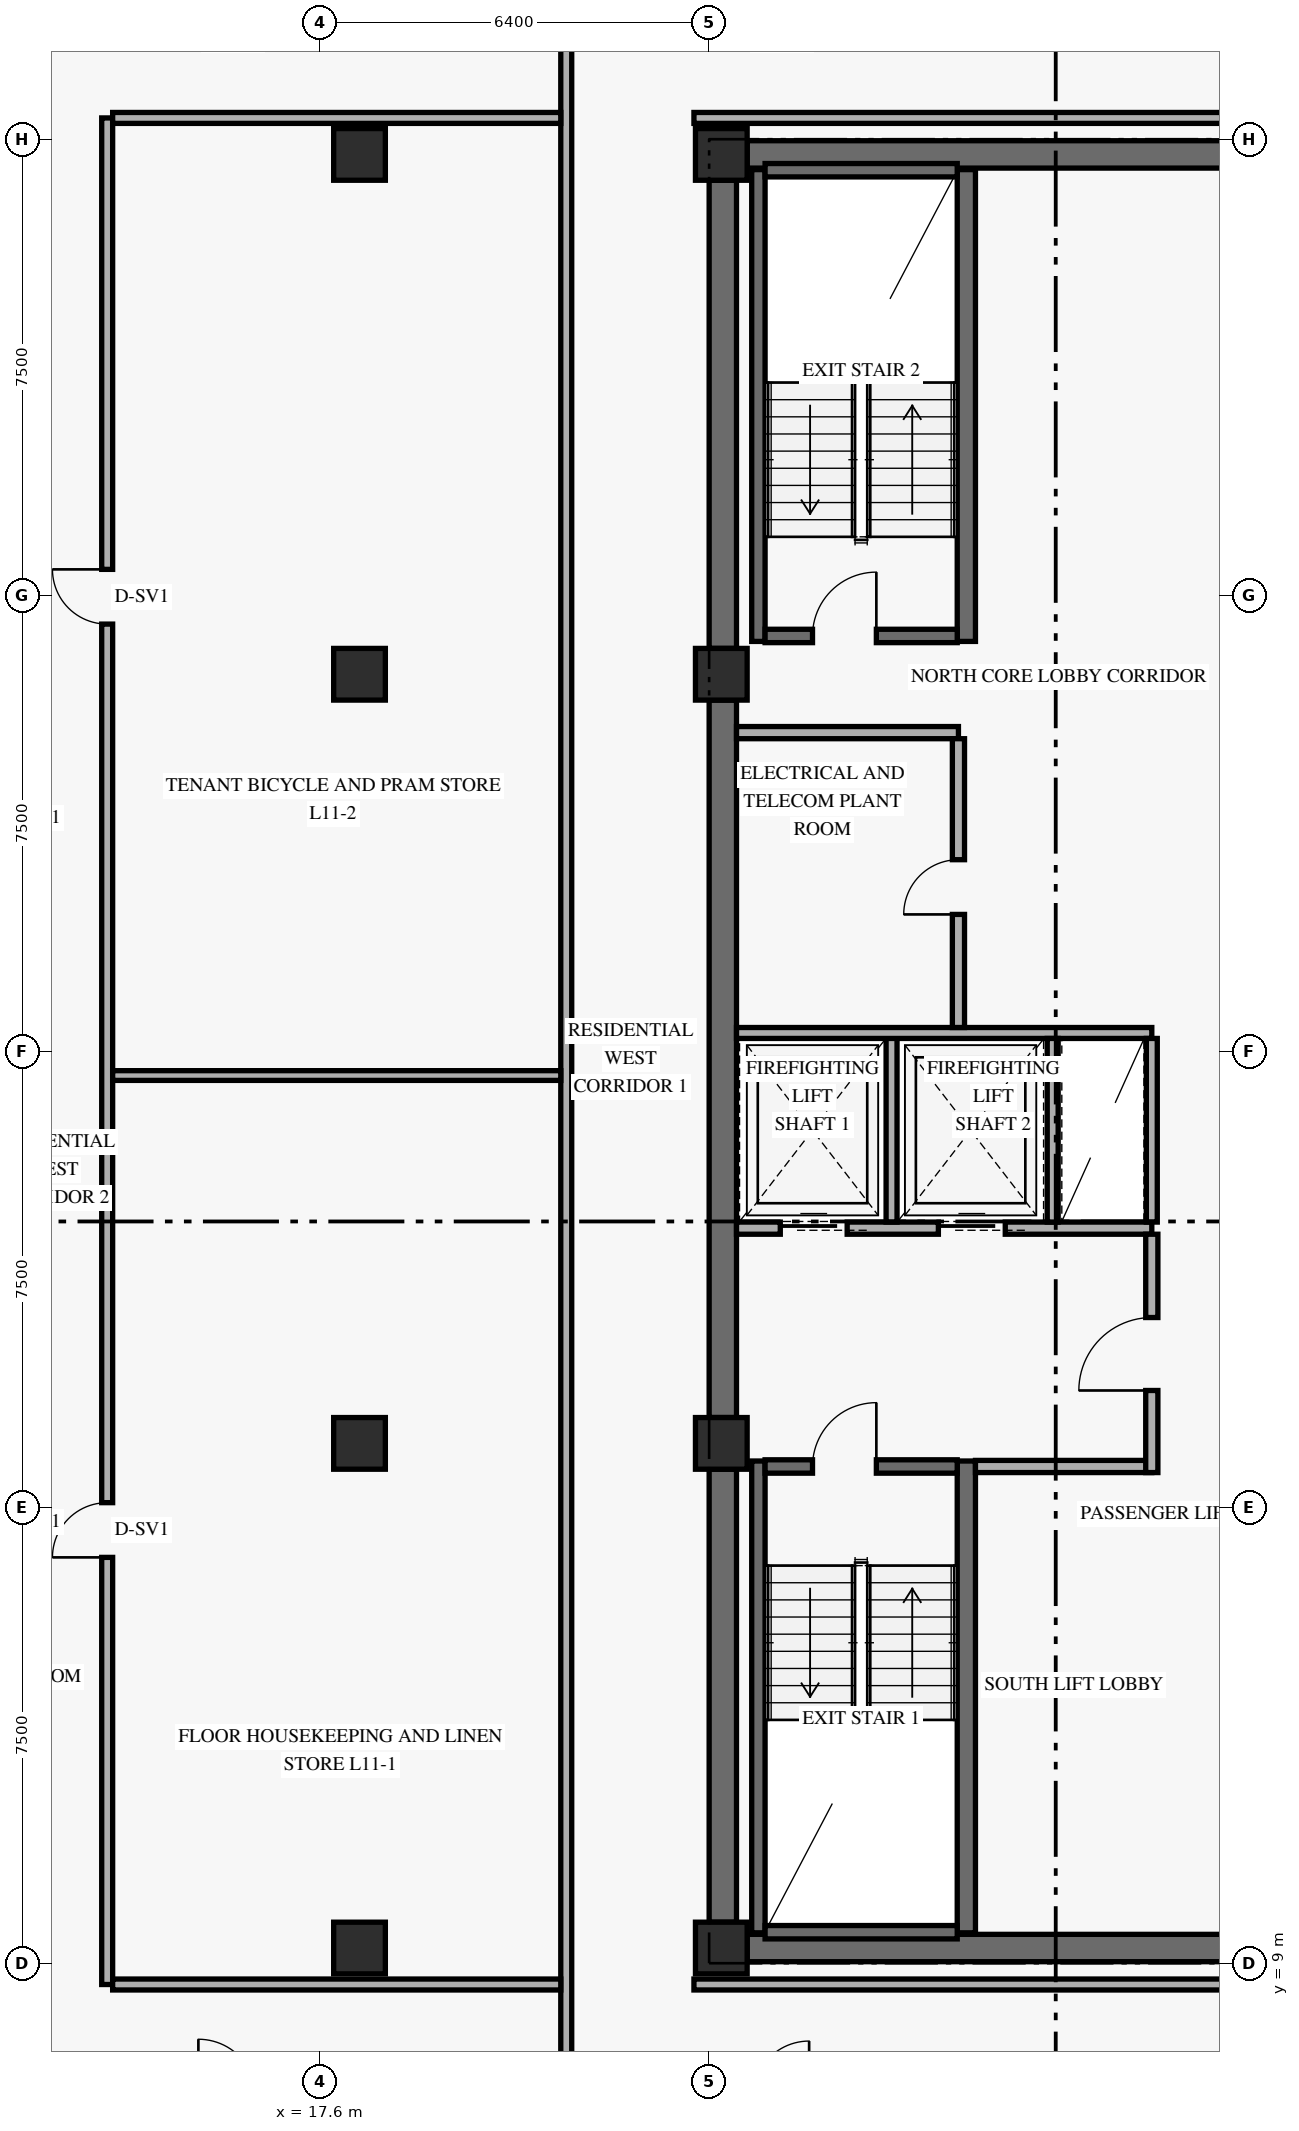
"""IFC4 building model, lengths in metres.
Left out: names, types, materials, properties, quantities, classifications, styles, units other than length and angle.
Written with IfcOpenShell. Run it as: python <this file> out.ifc"""

import sys

from ifc_helpers import new_model, si_unit, direction, frame, frame_2d, origin, origin_2d, place, context, subcontext, project, spatial, rectangle, extrude, element, fill, save


model = new_model("IFC4")
c1 = context("Model", 3, precision=1e-05, world=origin(), true_north=direction((0.0, 1.0)))
c2 = subcontext(c1, "Body", "Model", "MODEL_VIEW")
j1 = project(units=[si_unit("LENGTHUNIT", "METRE"), si_unit("PLANEANGLEUNIT", "RADIAN")], contexts=[c1])
p1 = place(None, origin())
s1 = spatial("IfcSite", under=j1, at=p1, CompositionType="ELEMENT")
p2 = place(p1, origin())
s2 = spatial("IfcBuilding", under=s1, at=p2, CompositionType="ELEMENT")
p3 = place(p2, frame((0.0, 0.0, 45.6)))
s3 = spatial("IfcBuildingStorey", under=s2, at=p3, CompositionType="ELEMENT", Elevation=45.6)
p4 = place(p3, frame((24.225, 9.675, 0.0), z_axis=(0.0, 0.0, 1.0), x_axis=(0.0, 1.0, 0.0)))
e1 = element("IfcWall", 1, at=p4, inside=s3, PredefinedType="SHEAR", context=c2, shape_type="SweptSolid", body=[
    extrude(rectangle(XDim=7.45, YDim=0.45, at=frame_2d((3.725, 0.0))), origin(), (0.0, 0.0, 1.0), 2.667),
])
p5 = place(p3, frame((24.225, 17.975, 0.0), z_axis=(0.0, 0.0, 1.0), x_axis=(0.0, 1.0, 0.0)))
e2 = element("IfcWall", 2, at=p5, inside=s3, PredefinedType="SHEAR", context=c2, shape_type="SweptSolid", body=[
    extrude(rectangle(XDim=11.8, YDim=0.45, at=frame_2d((5.9, 0.0))), origin(), (0.0, 0.0, 1.0), 2.667),
])
p6 = place(p3, frame((24.225, 30.625, 0.0), z_axis=(0.0, 0.0, 1.0), x_axis=(0.0, 1.0, 0.0)))
e3 = element("IfcWall", 3, at=p6, inside=s3, PredefinedType="SHEAR", context=c2, shape_type="SweptSolid", body=[
    extrude(rectangle(XDim=7.7, YDim=0.45, at=frame_2d((3.85, 0.0))), origin(), (0.0, 0.0, 1.0), 2.667),
])
for number, where, z_axis, x_axis in (
    (4, (24.625, 9.25, 0.0), (0.0, 0.0, 1.0), (1.0, 0.0, 0.0)),
    (5, (24.625, 38.75, 0.0), (0.0, 0.0, 1.0), (1.0, 0.0, 0.0)),
):
    element("IfcWall", number, at=place(p3, frame(where, z_axis=z_axis, x_axis=x_axis)), inside=s3, PredefinedType="SHEAR", context=c2, shape_type="SweptSolid", body=[
        extrude(rectangle(XDim=10.15, YDim=0.45, at=frame_2d((5.075, 0.0))), origin(), (0.0, 0.0, 1.0), 3.36),
    ])
p7 = place(p3, frame((24.81, 9.5, 0.0), z_axis=(0.0, 0.0, 1.0), x_axis=(0.0, 1.0, 0.0)))
e6 = element("IfcWall", 6, at=p7, inside=s3, PredefinedType="SHEAR", context=c2, shape_type="SweptSolid", body=[
    extrude(rectangle(XDim=7.76, YDim=0.22, at=frame_2d((3.88, 0.0))), origin(), (0.0, 0.0, 1.0), 3.36),
])
p8 = place(p3, frame((28.23, 9.5, 0.0), z_axis=(0.0, 0.0, 1.0), x_axis=(0.0, 1.0, 0.0)))
e7 = element("IfcWall", 7, at=p8, inside=s3, PredefinedType="SHEAR", context=c2, shape_type="SweptSolid", body=[
    extrude(rectangle(XDim=7.76, YDim=0.3, at=frame_2d((3.88, 0.0))), origin(), (0.0, 0.0, 1.0), 3.36),
])
p9 = place(p3, frame((24.92, 9.51, 0.0), z_axis=(0.0, 0.0, 1.0), x_axis=(1.0, 0.0, 0.0)))
e8 = element("IfcWall", 8, at=p9, inside=s3, PredefinedType="SHEAR", context=c2, shape_type="SweptSolid", body=[
    extrude(rectangle(XDim=3.16, YDim=0.22, at=frame_2d((1.58, 0.0))), origin(), (0.0, 0.0, 1.0), 3.36),
])
p10 = place(p3, frame((24.92, 17.17, 0.0), z_axis=(0.0, 0.0, 1.0), x_axis=(1.0, 0.0, 0.0)))
e9 = element("IfcWall", 9, at=p10, inside=s3, PredefinedType="SHEAR", context=c2, shape_type="SweptSolid", body=[
    extrude(rectangle(XDim=3.16, YDim=0.22, at=frame_2d((1.58, 0.0))), origin(), (0.0, 0.0, 1.0), 3.36),
])
p11 = place(p10, frame((0.78, 0.0, 0.0)))
e10 = element("IfcOpeningElement", 10, at=p11, cuts=e9, PredefinedType="OPENING", context=c2, shape_type="SweptSolid", body=[
    extrude(rectangle(XDim=1.05, YDim=2.15, at=frame_2d((0.525, 1.075))), frame((0.0, 0.12, 0.0), z_axis=(0.0, -1.0, 0.0), x_axis=(1.0, 0.0, 0.0)), (0.0, 0.0, 1.0), 0.24),
])
p12 = place(p3, frame((24.81, 30.74, 0.0), z_axis=(0.0, 0.0, 1.0), x_axis=(0.0, 1.0, 0.0)))
e11 = element("IfcWall", 11, at=p12, inside=s3, PredefinedType="SHEAR", context=c2, shape_type="SweptSolid", body=[
    extrude(rectangle(XDim=7.76, YDim=0.22, at=frame_2d((3.88, 0.0))), origin(), (0.0, 0.0, 1.0), 3.36),
])
p13 = place(p3, frame((28.23, 30.74, 0.0), z_axis=(0.0, 0.0, 1.0), x_axis=(0.0, 1.0, 0.0)))
e12 = element("IfcWall", 12, at=p13, inside=s3, PredefinedType="SHEAR", context=c2, shape_type="SweptSolid", body=[
    extrude(rectangle(XDim=7.76, YDim=0.3, at=frame_2d((3.88, 0.0))), origin(), (0.0, 0.0, 1.0), 3.36),
])
p14 = place(p3, frame((24.92, 30.83, 0.0), z_axis=(0.0, 0.0, 1.0), x_axis=(1.0, 0.0, 0.0)))
e13 = element("IfcWall", 13, at=p14, inside=s3, PredefinedType="SHEAR", context=c2, shape_type="SweptSolid", body=[
    extrude(rectangle(XDim=3.16, YDim=0.22, at=frame_2d((1.58, 0.0))), origin(), (0.0, 0.0, 1.0), 3.36),
])
p15 = place(p14, frame((0.78, 0.0, 0.0)))
e14 = element("IfcOpeningElement", 14, at=p15, cuts=e13, PredefinedType="OPENING", context=c2, shape_type="SweptSolid", body=[
    extrude(rectangle(XDim=1.05, YDim=2.15, at=frame_2d((0.525, 1.075))), frame((0.0, 0.12, 0.0), z_axis=(0.0, -1.0, 0.0), x_axis=(1.0, 0.0, 0.0)), (0.0, 0.0, 1.0), 0.24),
])
p16 = place(p3, frame((24.92, 38.49, 0.0), z_axis=(0.0, 0.0, 1.0), x_axis=(1.0, 0.0, 0.0)))
e15 = element("IfcWall", 15, at=p16, inside=s3, PredefinedType="SHEAR", context=c2, shape_type="SweptSolid", body=[
    extrude(rectangle(XDim=3.16, YDim=0.22, at=frame_2d((1.58, 0.0))), origin(), (0.0, 0.0, 1.0), 3.36),
])
for number, where, z_axis, x_axis in (
    (16, (18.25, 9.25, 0.0), (0.0, 0.0, 1.0), (1.0, 0.0, 0.0)),
    (17, (18.25, 17.55, 0.0), (0.0, 0.0, 1.0), (1.0, 0.0, 0.0)),
    (18, (18.25, 30.2, 0.0), (0.0, 0.0, 1.0), (1.0, 0.0, 0.0)),
    (19, (18.25, 38.75, 0.0), (0.0, 0.0, 1.0), (1.0, 0.0, 0.0)),
    (20, (24.2, 9.25, 0.0), (0.0, 0.0, 1.0), (1.0, 0.0, 0.0)),
    (21, (24.2, 17.55, 0.0), (0.0, 0.0, 1.0), (1.0, 0.0, 0.0)),
    (22, (24.2, 30.2, 0.0), (0.0, 0.0, 1.0), (1.0, 0.0, 0.0)),
    (23, (24.2, 38.75, 0.0), (0.0, 0.0, 1.0), (1.0, 0.0, 0.0)),
):
    element("IfcColumn", number, at=place(p3, frame(where, z_axis=z_axis, x_axis=x_axis)), inside=s3, PredefinedType="COLUMN", context=c2, shape_type="SweptSolid", body=[
        extrude(rectangle(XDim=0.85, YDim=0.85, at=origin_2d()), origin(), (0.0, 0.0, 1.0), 3.6),
    ])
p17 = place(p3, frame((24.45, 21.09, 0.0), z_axis=(0.0, 0.0, 1.0), x_axis=(1.0, 0.0, 0.0)))
e24 = element("IfcWall", 24, at=p17, inside=s3, PredefinedType="STANDARD", context=c2, shape_type="SweptSolid", body=[
    extrude(rectangle(XDim=6.83, YDim=0.2, at=frame_2d((3.415, 0.0))), origin(), (0.0, 0.0, 1.0), 3.36),
])
p18 = place(p17, frame((0.72, 0.0, 0.0)))
e25 = element("IfcOpeningElement", 25, at=p18, cuts=e24, PredefinedType="OPENING", context=c2, shape_type="SweptSolid", body=[
    extrude(rectangle(XDim=1.1, YDim=2.2, at=frame_2d((0.55, 1.1))), frame((0.0, 0.11, 0.0), z_axis=(0.0, -1.0, 0.0), x_axis=(1.0, 0.0, 0.0)), (0.0, 0.0, 1.0), 0.22),
])
p19 = place(p17, frame((3.32, 0.0, 0.0)))
e26 = element("IfcOpeningElement", 26, at=p19, cuts=e24, PredefinedType="OPENING", context=c2, shape_type="SweptSolid", body=[
    extrude(rectangle(XDim=1.1, YDim=2.2, at=frame_2d((0.55, 1.1))), frame((0.0, 0.11, 0.0), z_axis=(0.0, -1.0, 0.0), x_axis=(1.0, 0.0, 0.0)), (0.0, 0.0, 1.0), 0.22),
])
p20 = place(p3, frame((28.38, 17.17, 0.0), z_axis=(0.0, 0.0, 1.0), x_axis=(1.0, 0.0, 0.0)))
e27 = element("IfcWall", 27, at=p20, inside=s3, PredefinedType="STANDARD", context=c2, shape_type="SweptSolid", body=[
    extrude(rectangle(XDim=2.9, YDim=0.2, at=frame_2d((1.45, 0.0))), origin(), (0.0, 0.0, 1.0), 3.36),
])
p21 = place(p3, frame((31.28, 17.07, 0.0), z_axis=(0.0, 0.0, 1.0), x_axis=(0.0, 1.0, 0.0)))
e28 = element("IfcWall", 28, at=p21, inside=s3, PredefinedType="STANDARD", context=c2, shape_type="SweptSolid", body=[
    extrude(rectangle(XDim=3.92, YDim=0.2, at=frame_2d((1.96, 0.0))), origin(), (0.0, 0.0, 1.0), 2.649),
])
p22 = place(p21, frame((1.35, 0.0, 0.0)))
e29 = element("IfcOpeningElement", 29, at=p22, cuts=e28, PredefinedType="OPENING", context=c2, shape_type="SweptSolid", body=[
    extrude(rectangle(XDim=1.2, YDim=2.15, at=frame_2d((0.6, 1.075))), frame((0.0, 0.11, 0.0), z_axis=(0.0, -1.0, 0.0), x_axis=(1.0, 0.0, 0.0)), (0.0, 0.0, 1.0), 0.22),
])
p23 = place(p3, frame((27.0, 21.19, 0.0), z_axis=(0.0, 0.0, 1.0), x_axis=(0.0, 1.0, 0.0)))
e30 = element("IfcWall", 30, at=p23, inside=s3, PredefinedType="STANDARD", context=c2, shape_type="SweptSolid", body=[
    extrude(rectangle(XDim=3.11, YDim=0.18, at=frame_2d((1.555, 0.0))), origin(), (0.0, 0.0, 1.0), 3.36),
])
p24 = place(p3, frame((24.45, 24.3, 0.0), z_axis=(0.0, 0.0, 1.0), x_axis=(1.0, 0.0, 0.0)))
e31 = element("IfcWall", 31, at=p24, inside=s3, PredefinedType="STANDARD", context=c2, shape_type="SweptSolid", body=[
    extrude(rectangle(XDim=6.83, YDim=0.18, at=frame_2d((3.415, 0.0))), origin(), (0.0, 0.0, 1.0), 3.36),
])
for number, where, z_axis, x_axis in (
    (32, (29.65, 21.19, 0.0), (0.0, 0.0, 1.0), (0.0, 1.0, 0.0)),
    (33, (31.28, 21.19, 0.0), (0.0, 0.0, 1.0), (0.0, 1.0, 0.0)),
):
    element("IfcWall", number, at=place(p3, frame(where, z_axis=z_axis, x_axis=x_axis)), inside=s3, PredefinedType="STANDARD", context=c2, shape_type="SweptSolid", body=[
        extrude(rectangle(XDim=3.02, YDim=0.18, at=frame_2d((1.51, 0.0))), origin(), (0.0, 0.0, 1.0), 3.36),
    ])
p25 = place(p3, frame((24.45, 29.24, 0.0), z_axis=(0.0, 0.0, 1.0), x_axis=(1.0, 0.0, 0.0)))
e34 = element("IfcWall", 34, at=p25, inside=s3, PredefinedType="STANDARD", context=c2, shape_type="SweptSolid", body=[
    extrude(rectangle(XDim=3.65, YDim=0.2, at=frame_2d((1.825, 0.0))), origin(), (0.0, 0.0, 1.0), 3.36),
])
p26 = place(p3, frame((28.1, 24.39, 0.0), z_axis=(0.0, 0.0, 1.0), x_axis=(0.0, 1.0, 0.0)))
e35 = element("IfcWall", 35, at=p26, inside=s3, PredefinedType="STANDARD", context=c2, shape_type="SweptSolid", body=[
    extrude(rectangle(XDim=4.75, YDim=0.2, at=frame_2d((2.375, 0.0))), origin(), (0.0, 0.0, 1.0), 3.36),
])
p27 = place(p26, frame((1.86, 0.0, 0.0)))
e36 = element("IfcOpeningElement", 36, at=p27, cuts=e35, PredefinedType="OPENING", context=c2, shape_type="SweptSolid", body=[
    extrude(rectangle(XDim=0.9, YDim=2.1, at=frame_2d((0.45, 1.05))), frame((0.0, 0.11, 0.0), z_axis=(0.0, -1.0, 0.0), x_axis=(1.0, 0.0, 0.0)), (0.0, 0.0, 1.0), 0.22),
])
p28 = place(p3, frame((21.65, 6.8, 0.0), z_axis=(0.0, 0.0, 1.0), x_axis=(0.0, 1.0, 0.0)))
e37 = element("IfcWall", 37, at=p28, inside=s3, PredefinedType="STANDARD", context=c2, shape_type="SweptSolid", body=[
    extrude(rectangle(XDim=34.4, YDim=0.18, at=frame_2d((17.2, 0.0))), origin(), (0.0, 0.0, 1.0), 2.649),
])
for number, where, z_axis, x_axis in (
    (38, (23.75, 8.65, 0.0), (0.0, 0.0, 1.0), (1.0, 0.0, 0.0)),
    (39, (23.75, 39.35, 0.0), (0.0, 0.0, 1.0), (1.0, 0.0, 0.0)),
):
    element("IfcWall", number, at=place(p3, frame(where, z_axis=z_axis, x_axis=x_axis)), inside=s3, PredefinedType="STANDARD", context=c2, shape_type="SweptSolid", body=[
        extrude(rectangle(XDim=11.67, YDim=0.18, at=frame_2d((5.835, 0.0))), origin(), (0.0, 0.0, 1.0), 2.649),
    ])
p29 = place(p3, frame((14.1, 8.65, 0.0), z_axis=(0.0, 0.0, 1.0), x_axis=(0.0, 1.0, 0.0)))
e40 = element("IfcWall", 40, at=p29, inside=s3, PredefinedType="STANDARD", context=c2, shape_type="SweptSolid", body=[
    extrude(rectangle(XDim=30.7, YDim=0.18, at=frame_2d((15.35, 0.0))), origin(), (0.0, 0.0, 1.0), 2.649),
])
p30 = place(p29, frame((7.025, 0.0, 0.0)))
e41 = element("IfcOpeningElement", 41, at=p30, cuts=e40, PredefinedType="OPENING", context=c2, shape_type="SweptSolid", body=[
    extrude(rectangle(XDim=0.9, YDim=2.1, at=frame_2d((0.45, 1.05))), frame((0.0, 0.1, 0.0), z_axis=(0.0, -1.0, 0.0), x_axis=(1.0, 0.0, 0.0)), (0.0, 0.0, 1.0), 0.2),
])
p31 = place(p29, frame((22.375, 0.0, 0.0)))
e42 = element("IfcOpeningElement", 42, at=p31, cuts=e40, PredefinedType="OPENING", context=c2, shape_type="SweptSolid", body=[
    extrude(rectangle(XDim=0.9, YDim=2.1, at=frame_2d((0.45, 1.05))), frame((0.0, 0.1, 0.0), z_axis=(0.0, -1.0, 0.0), x_axis=(1.0, 0.0, 0.0)), (0.0, 0.0, 1.0), 0.2),
])
for number, where, z_axis, x_axis in (
    (43, (14.19, 8.65, 0.0), (0.0, 0.0, 1.0), (1.0, 0.0, 0.0)),
    (44, (14.19, 39.35, 0.0), (0.0, 0.0, 1.0), (1.0, 0.0, 0.0)),
):
    element("IfcWall", number, at=place(p3, frame(where, z_axis=z_axis, x_axis=x_axis)), inside=s3, PredefinedType="STANDARD", context=c2, shape_type="SweptSolid", body=[
        extrude(rectangle(XDim=7.37, YDim=0.18, at=frame_2d((3.685, 0.0))), origin(), (0.0, 0.0, 1.0), 2.649),
    ])
p32 = place(p3, frame((14.19, 23.6, 0.0), z_axis=(0.0, 0.0, 1.0), x_axis=(1.0, 0.0, 0.0)))
e45 = element("IfcWall", 45, at=p32, inside=s3, PredefinedType="PARTITIONING", context=c2, shape_type="SweptSolid", body=[
    extrude(rectangle(XDim=7.37, YDim=0.16, at=frame_2d((3.685, 0.0))), origin(), (0.0, 0.0, 1.0), 2.649),
])
p33 = place(p11, frame((1.05, 0.0, 0.0), z_axis=(0.0, 0.0, 1.0), x_axis=(-1.0, 0.0, 0.0)))
e46 = element("IfcDoor", 46, at=p33, inside=s3, OperationType="SINGLE_SWING_LEFT", PredefinedType="DOOR", context=c2, shape_type="SweptSolid", body=[
    extrude(rectangle(XDim=1.05, YDim=2.15, at=frame_2d((0.525, 1.075))), frame((0.0, 0.025, 0.0), z_axis=(0.0, -1.0, 0.0), x_axis=(1.0, 0.0, 0.0)), (0.0, 0.0, 1.0), 0.05),
])
fill(e10, e46)
p34 = place(p15, origin())
e47 = element("IfcDoor", 47, at=p34, inside=s3, OperationType="SINGLE_SWING_RIGHT", PredefinedType="DOOR", context=c2, shape_type="SweptSolid", body=[
    extrude(rectangle(XDim=1.05, YDim=2.15, at=frame_2d((0.525, 1.075))), frame((0.0, 0.025, 0.0), z_axis=(0.0, -1.0, 0.0), x_axis=(1.0, 0.0, 0.0)), (0.0, 0.0, 1.0), 0.05),
])
fill(e14, e47)
p35 = place(p18, origin())
e48 = element("IfcDoor", 48, at=p35, inside=s3, OperationType="SLIDING_TO_LEFT", PredefinedType="DOOR", context=c2, shape_type="SweptSolid", body=[
    extrude(rectangle(XDim=1.1, YDim=2.2, at=frame_2d((0.55, 1.1))), frame((0.0, 0.025, 0.0), z_axis=(0.0, -1.0, 0.0), x_axis=(1.0, 0.0, 0.0)), (0.0, 0.0, 1.0), 0.05),
])
fill(e25, e48)
p36 = place(p19, origin())
e49 = element("IfcDoor", 49, at=p36, inside=s3, OperationType="SLIDING_TO_LEFT", PredefinedType="DOOR", context=c2, shape_type="SweptSolid", body=[
    extrude(rectangle(XDim=1.1, YDim=2.2, at=frame_2d((0.55, 1.1))), frame((0.0, 0.025, 0.0), z_axis=(0.0, -1.0, 0.0), x_axis=(1.0, 0.0, 0.0)), (0.0, 0.0, 1.0), 0.05),
])
fill(e26, e49)
p37 = place(p22, origin())
e50 = element("IfcDoor", 50, at=p37, inside=s3, OperationType="SINGLE_SWING_LEFT", PredefinedType="DOOR", context=c2, shape_type="SweptSolid", body=[
    extrude(rectangle(XDim=1.2, YDim=2.15, at=frame_2d((0.6, 1.075))), frame((0.0, 0.025, 0.0), z_axis=(0.0, -1.0, 0.0), x_axis=(1.0, 0.0, 0.0)), (0.0, 0.0, 1.0), 0.05),
])
fill(e29, e50)
p38 = place(p27, origin())
e51 = element("IfcDoor", 51, at=p38, inside=s3, OperationType="SINGLE_SWING_LEFT", PredefinedType="DOOR", context=c2, shape_type="SweptSolid", body=[
    extrude(rectangle(XDim=0.9, YDim=2.1, at=frame_2d((0.45, 1.05))), frame((0.0, 0.025, 0.0), z_axis=(0.0, -1.0, 0.0), x_axis=(1.0, 0.0, 0.0)), (0.0, 0.0, 1.0), 0.05),
])
fill(e36, e51)
p39 = place(p30, origin())
e52 = element("IfcDoor", 52, at=p39, inside=s3, OperationType="SINGLE_SWING_LEFT", PredefinedType="DOOR", context=c2, shape_type="SweptSolid", body=[
    extrude(rectangle(XDim=0.9, YDim=2.1, at=frame_2d((0.45, 1.05))), frame((0.0, 0.025, 0.0), z_axis=(0.0, -1.0, 0.0), x_axis=(1.0, 0.0, 0.0)), (0.0, 0.0, 1.0), 0.05),
])
fill(e41, e52)
p40 = place(p31, origin())
e53 = element("IfcDoor", 53, at=p40, inside=s3, OperationType="SINGLE_SWING_RIGHT", PredefinedType="DOOR", context=c2, shape_type="SweptSolid", body=[
    extrude(rectangle(XDim=0.9, YDim=2.1, at=frame_2d((0.45, 1.05))), frame((0.0, 0.025, 0.0), z_axis=(0.0, -1.0, 0.0), x_axis=(1.0, 0.0, 0.0)), (0.0, 0.0, 1.0), 0.05),
])
fill(e42, e53)
save(model, sys.argv[1])
